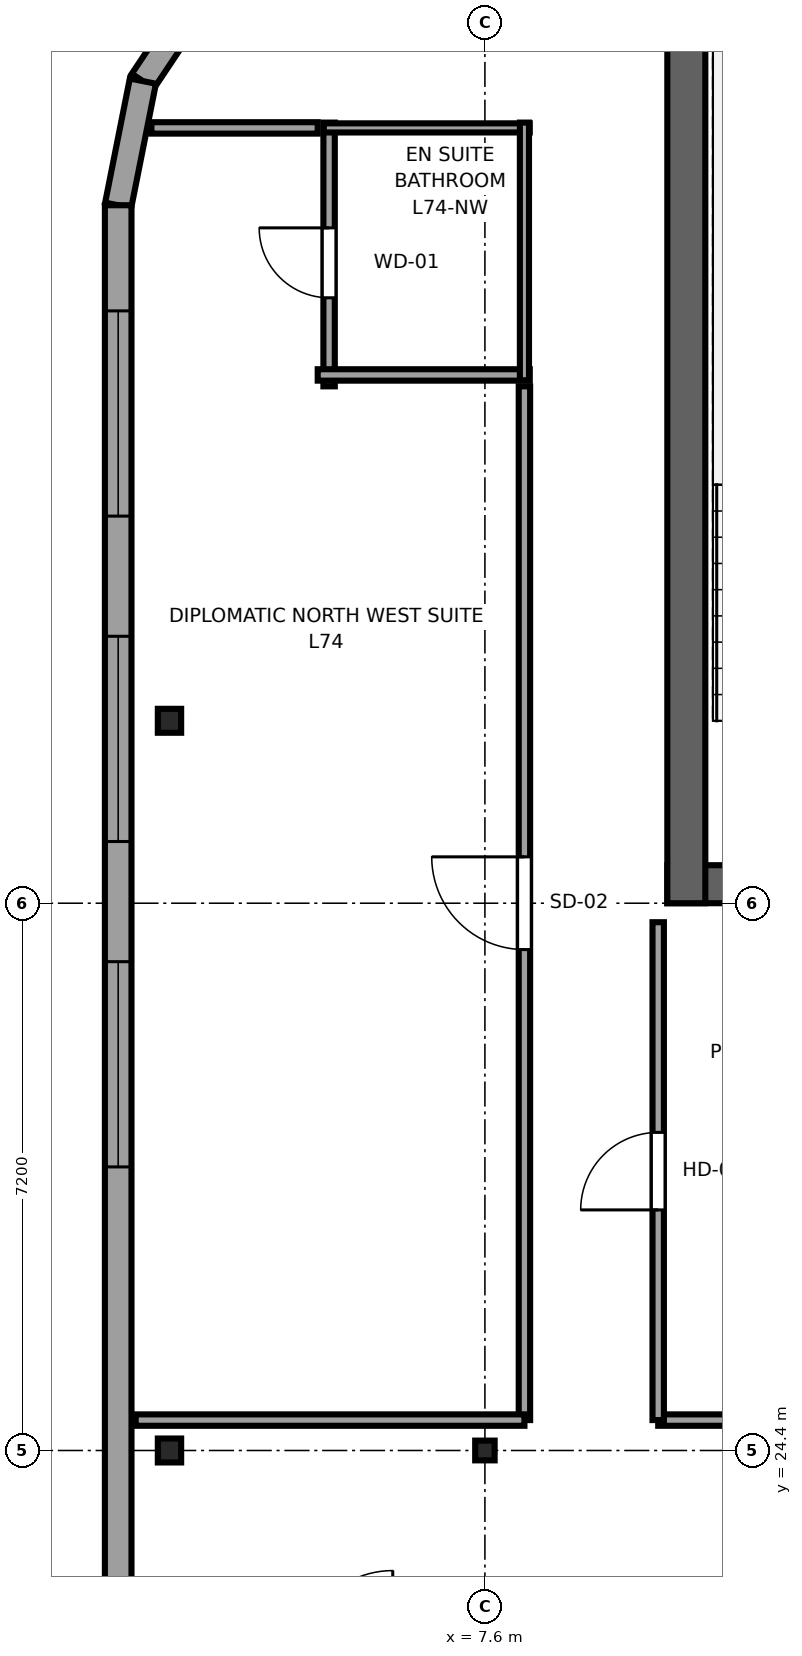
"""IFC4 building model, lengths in metres.
Left out: names, types, materials, properties, quantities, classifications, styles, units other than length and angle.
Written with IfcOpenShell. Run it as: python <this file> out.ifc"""

import sys

from ifc_helpers import new_model, si_unit, direction, frame, frame_2d, origin, origin_2d, place, context, subcontext, project, spatial, rectangle, i_section, extrude, source, transform, mapped, element, fill, save


model = new_model("IFC4")
c1 = context("Model", 3, precision=1e-05, world=origin(), true_north=direction((0.0, 1.0)))
c2 = subcontext(c1, "Body", "Model", "MODEL_VIEW")
j1 = project(units=[si_unit("LENGTHUNIT", "METRE"), si_unit("PLANEANGLEUNIT", "RADIAN")], contexts=[c1])
p1 = place(None, origin())
s1 = spatial("IfcSite", under=j1, at=p1, CompositionType="ELEMENT")
p2 = place(p1, origin())
s2 = spatial("IfcBuilding", under=s1, at=p2, CompositionType="ELEMENT")
p3 = place(p2, frame((0.0, 0.0, 278.6)))
s3 = spatial("IfcBuildingStorey", under=s2, at=p3, CompositionType="ELEMENT", Elevation=278.6)
p4 = place(p3, frame((10.0, 31.85, 0.0), z_axis=(0.0, 0.0, 1.0), x_axis=(1.0, 0.0, 0.0)))
e1 = element("IfcWall", 1, at=p4, inside=s3, PredefinedType="SHEAR", context=c2, shape_type="SweptSolid", body=[
    extrude(rectangle(XDim=26.0, YDim=0.5, at=frame_2d((13.0, 0.0))), origin(), (0.0, 0.0, 1.0), 3.55),
])
p5 = place(p4, frame((7.45, 0.0, 0.0), z_axis=(0.0, 0.0, 1.0), x_axis=(-1.0, 0.0, 0.0)))
e2 = element("IfcOpeningElement", 2, at=p5, cuts=e1, PredefinedType="OPENING", context=c2, shape_type="SweptSolid", body=[
    extrude(rectangle(XDim=1.5, YDim=2.04, at=frame_2d((0.75, 1.02))), frame((0.0, 0.26, 0.0), z_axis=(0.0, -1.0, 0.0), x_axis=(1.0, 0.0, 0.0)), (0.0, 0.0, 1.0), 0.52),
])
p6 = place(p4, frame((13.75, 0.0, 0.0), z_axis=(0.0, 0.0, 1.0), x_axis=(-1.0, 0.0, 0.0)))
e3 = element("IfcOpeningElement", 3, at=p6, cuts=e1, PredefinedType="OPENING", context=c2, shape_type="SweptSolid", body=[
    extrude(rectangle(XDim=1.5, YDim=2.04, at=frame_2d((0.75, 1.02))), frame((0.0, 0.26, 0.0), z_axis=(0.0, -1.0, 0.0), x_axis=(1.0, 0.0, 0.0)), (0.0, 0.0, 1.0), 0.52),
])
p7 = place(p4, frame((20.05, 0.0, 0.0), z_axis=(0.0, 0.0, 1.0), x_axis=(-1.0, 0.0, 0.0)))
e4 = element("IfcOpeningElement", 4, at=p7, cuts=e1, PredefinedType="OPENING", context=c2, shape_type="SweptSolid", body=[
    extrude(rectangle(XDim=1.5, YDim=2.04, at=frame_2d((0.75, 1.02))), frame((0.0, 0.26, 0.0), z_axis=(0.0, -1.0, 0.0), x_axis=(1.0, 0.0, 0.0)), (0.0, 0.0, 1.0), 0.52),
])
p8 = place(p3, frame((10.25, 31.6, 0.0), z_axis=(0.0, 0.0, 1.0), x_axis=(0.0, 1.0, 0.0)))
e5 = element("IfcWall", 5, at=p8, inside=s3, PredefinedType="SHEAR", context=c2, shape_type="SweptSolid", body=[
    extrude(rectangle(XDim=13.6, YDim=0.5, at=frame_2d((6.8, 0.0))), origin(), (0.0, 0.0, 1.0), 3.55),
])
m1 = source(origin(), c2, "Body", "SweptSolid", [
    extrude(i_section(OverallWidth=0.307, OverallDepth=0.315, WebThickness=0.012, FlangeThickness=0.019, FilletRadius=0.017, at=origin_2d()), origin(), (0.0, 0.0, 1.0), 3.55),
])
p9 = place(p3, frame((3.45, 24.4, 0.0), z_axis=(0.0, 0.0, 1.0), x_axis=(1.0, 0.0, 0.0)))
e6 = element("IfcColumn", 6, at=p9, inside=s3, PredefinedType="COLUMN", context=c2, shape_type="MappedRepresentation", body=[
    mapped(m1, transform((0.0, 0.0, 0.0), x_axis=(1.0, 0.0, 0.0), y_axis=(0.0, 1.0, 0.0), z_axis=(0.0, 0.0, 1.0), scale=1.0)),
])
m2 = source(origin(), c2, "Body", "SweptSolid", [
    extrude(i_section(OverallWidth=0.256, OverallDepth=0.26, WebThickness=0.01, FlangeThickness=0.017, FilletRadius=0.014, at=origin_2d()), origin(), (0.0, 0.0, 1.0), 3.55),
])
p10 = place(p3, frame((7.6, 24.4, 0.0), z_axis=(0.0, 0.0, 1.0), x_axis=(1.0, 0.0, 0.0)))
e7 = element("IfcColumn", 7, at=p10, inside=s3, PredefinedType="COLUMN", context=c2, shape_type="MappedRepresentation", body=[
    mapped(m2, transform((0.0, 0.0, 0.0), x_axis=(1.0, 0.0, 0.0), y_axis=(0.0, 1.0, 0.0), z_axis=(0.0, 0.0, 1.0), scale=1.0)),
])
p11 = place(p3, frame((3.45, 34.0, 0.0), z_axis=(0.0, 0.0, 1.0), x_axis=(1.0, 0.0, 0.0)))
e8 = element("IfcColumn", 8, at=p11, inside=s3, PredefinedType="COLUMN", context=c2, shape_type="MappedRepresentation", body=[
    mapped(m1, transform((0.0, 0.0, 0.0), x_axis=(1.0, 0.0, 0.0), y_axis=(0.0, 1.0, 0.0), z_axis=(0.0, 0.0, 1.0), scale=1.0)),
])
p12 = place(p3, frame((4.015, 43.785, 0.0), z_axis=(0.0, 0.0, 1.0), x_axis=(-0.555623290322, -0.831434158098, 0.0)))
e9 = element("IfcWall", 9, at=p12, inside=s3, PredefinedType="SOLIDWALL", context=c2, shape_type="SweptSolid", body=[
    extrude(rectangle(XDim=1.647, YDim=0.35, at=frame_2d((0.824, 0.0))), origin(), (0.0, 0.0, 1.0), 2.86),
])
p13 = place(p3, frame((3.1, 42.416, 0.0), z_axis=(0.0, 0.0, 1.0), x_axis=(-0.195044345786, -0.980794424524, 0.0)))
e10 = element("IfcWall", 10, at=p13, inside=s3, PredefinedType="SOLIDWALL", context=c2, shape_type="SweptSolid", body=[
    extrude(rectangle(XDim=1.665, YDim=0.35, at=frame_2d((0.833, 0.0))), origin(), (0.0, 0.0, 1.0), 3.33),
])
p14 = place(p3, frame((2.775, 40.783, 0.0), z_axis=(0.0, 0.0, 1.0), x_axis=(0.0, -1.0, 0.0)))
e11 = element("IfcWall", 11, at=p14, inside=s3, PredefinedType="SOLIDWALL", context=c2, shape_type="SweptSolid", body=[
    extrude(rectangle(XDim=31.166, YDim=0.35, at=frame_2d((15.583, 0.0))), origin(), (0.0, 0.0, 1.0), 3.33),
])
p15 = place(p14, frame((1.39, 0.0, 0.68)))
e12 = element("IfcOpeningElement", 12, at=p15, cuts=e11, PredefinedType="OPENING", context=c2, shape_type="SweptSolid", body=[
    extrude(rectangle(XDim=2.7, YDim=1.95, at=frame_2d((1.35, 0.975))), frame((0.0, 0.185, 0.0), z_axis=(0.0, -1.0, 0.0), x_axis=(1.0, 0.0, 0.0)), (0.0, 0.0, 1.0), 0.37),
])
p16 = place(p14, frame((5.671, 0.0, 0.68)))
e13 = element("IfcOpeningElement", 13, at=p16, cuts=e11, PredefinedType="OPENING", context=c2, shape_type="SweptSolid", body=[
    extrude(rectangle(XDim=2.7, YDim=1.95, at=frame_2d((1.35, 0.975))), frame((0.0, 0.185, 0.0), z_axis=(0.0, -1.0, 0.0), x_axis=(1.0, 0.0, 0.0)), (0.0, 0.0, 1.0), 0.37),
])
p17 = place(p14, frame((9.952, 0.0, 0.68)))
e14 = element("IfcOpeningElement", 14, at=p17, cuts=e11, PredefinedType="OPENING", context=c2, shape_type="SweptSolid", body=[
    extrude(rectangle(XDim=2.7, YDim=1.95, at=frame_2d((1.35, 0.975))), frame((0.0, 0.185, 0.0), z_axis=(0.0, -1.0, 0.0), x_axis=(1.0, 0.0, 0.0)), (0.0, 0.0, 1.0), 0.37),
])
p18 = place(p14, frame((19.564, 0.0, 0.68)))
e15 = element("IfcOpeningElement", 15, at=p18, cuts=e11, PredefinedType="OPENING", context=c2, shape_type="SweptSolid", body=[
    extrude(rectangle(XDim=2.7, YDim=1.95, at=frame_2d((1.35, 0.975))), frame((0.0, 0.185, 0.0), z_axis=(0.0, -1.0, 0.0), x_axis=(1.0, 0.0, 0.0)), (0.0, 0.0, 1.0), 0.37),
])
p19 = place(p14, frame((27.075, 0.0, 0.68)))
e16 = element("IfcOpeningElement", 16, at=p19, cuts=e11, PredefinedType="OPENING", context=c2, shape_type="SweptSolid", body=[
    extrude(rectangle(XDim=2.7, YDim=1.95, at=frame_2d((1.35, 0.975))), frame((0.0, 0.185, 0.0), z_axis=(0.0, -1.0, 0.0), x_axis=(1.0, 0.0, 0.0)), (0.0, 0.0, 1.0), 0.37),
])
p20 = place(p3, frame((5.55, 38.4, 0.0), z_axis=(0.0, 0.0, 1.0), x_axis=(0.0, 1.0, 0.0)))
e17 = element("IfcWall", 17, at=p20, inside=s3, PredefinedType="PARTITIONING", context=c2, shape_type="SweptSolid", body=[
    extrude(rectangle(XDim=3.47, YDim=0.15, at=frame_2d((1.735, 0.0))), origin(), (0.0, 0.0, 1.0), 3.33),
])
p21 = place(p20, frame((1.165, 0.0, 0.0)))
e18 = element("IfcOpeningElement", 18, at=p21, cuts=e17, PredefinedType="OPENING", context=c2, shape_type="SweptSolid", body=[
    extrude(rectangle(XDim=0.92, YDim=2.01, at=frame_2d((0.46, 1.005))), frame((0.0, 0.085, 0.0), z_axis=(0.0, -1.0, 0.0), x_axis=(1.0, 0.0, 0.0)), (0.0, 0.0, 1.0), 0.17),
])
p22 = place(p3, frame((5.4, 38.55, 0.0), z_axis=(0.0, 0.0, 1.0), x_axis=(1.0, 0.0, 0.0)))
e19 = element("IfcWall", 19, at=p22, inside=s3, PredefinedType="PARTITIONING", context=c2, shape_type="SweptSolid", body=[
    extrude(rectangle(XDim=2.79, YDim=0.15, at=frame_2d((1.395, 0.0))), origin(), (0.0, 0.0, 1.0), 3.33),
])
p23 = place(p3, frame((5.48, 41.8, 0.0), z_axis=(0.0, 0.0, 1.0), x_axis=(1.0, 0.0, 0.0)))
e20 = element("IfcWall", 20, at=p23, inside=s3, PredefinedType="PLUMBINGWALL", context=c2, shape_type="SweptSolid", body=[
    extrude(rectangle(XDim=2.71, YDim=0.12, at=frame_2d((1.355, 0.0))), origin(), (0.0, 0.0, 1.0), 3.33),
])
p24 = place(p3, frame((8.12, 38.48, 0.0), z_axis=(0.0, 0.0, 1.0), x_axis=(0.0, 1.0, 0.0)))
e21 = element("IfcWall", 21, at=p24, inside=s3, PredefinedType="PLUMBINGWALL", context=c2, shape_type="SweptSolid", body=[
    extrude(rectangle(XDim=3.39, YDim=0.12, at=frame_2d((1.695, 0.0))), origin(), (0.0, 0.0, 1.0), 3.33),
])
p25 = place(p3, frame((8.12, 24.8, 0.0), z_axis=(0.0, 0.0, 1.0), x_axis=(0.0, 1.0, 0.0)))
e22 = element("IfcWall", 22, at=p25, inside=s3, PredefinedType="PARTITIONING", context=c2, shape_type="SweptSolid", body=[
    extrude(rectangle(XDim=13.6, YDim=0.15, at=frame_2d((6.8, 0.0))), origin(), (0.0, 0.0, 1.0), 3.33),
])
p26 = place(p25, frame((6.19, 0.0, 0.0)))
e23 = element("IfcOpeningElement", 23, at=p26, cuts=e22, PredefinedType="OPENING", context=c2, shape_type="SweptSolid", body=[
    extrude(rectangle(XDim=1.22, YDim=2.08, at=frame_2d((0.61, 1.04))), frame((0.0, 0.085, 0.0), z_axis=(0.0, -1.0, 0.0), x_axis=(1.0, 0.0, 0.0)), (0.0, 0.0, 1.0), 0.17),
])
p27 = place(p3, frame((3.005, 24.8, 0.0), z_axis=(0.0, 0.0, 1.0), x_axis=(1.0, 0.0, 0.0)))
e24 = element("IfcWall", 24, at=p27, inside=s3, PredefinedType="PARTITIONING", context=c2, shape_type="SweptSolid", body=[
    extrude(rectangle(XDim=5.115, YDim=0.15, at=frame_2d((2.558, 0.0))), origin(), (0.0, 0.0, 1.0), 3.33),
])
p28 = place(p3, frame((3.212, 41.8, 0.0), z_axis=(0.0, 0.0, 1.0), x_axis=(1.0, 0.0, 0.0)))
e25 = element("IfcWall", 25, at=p28, inside=s3, PredefinedType="PARTITIONING", context=c2, shape_type="SweptSolid", body=[
    extrude(rectangle(XDim=2.188, YDim=0.15, at=frame_2d((1.094, 0.0))), origin(), (0.0, 0.0, 1.0), 3.33),
])
p29 = place(p3, frame((9.88, 24.8, 0.0), z_axis=(0.0, 0.0, 1.0), x_axis=(1.0, 0.0, 0.0)))
e26 = element("IfcWall", 26, at=p29, inside=s3, PredefinedType="PARTITIONING", context=c2, shape_type="SweptSolid", body=[
    extrude(rectangle(XDim=4.32, YDim=0.15, at=frame_2d((2.16, 0.0))), origin(), (0.0, 0.0, 1.0), 3.33),
])
p30 = place(p3, frame((9.88, 24.8, 0.0), z_axis=(0.0, 0.0, 1.0), x_axis=(0.0, 1.0, 0.0)))
e27 = element("IfcWall", 27, at=p30, inside=s3, PredefinedType="PARTITIONING", context=c2, shape_type="SweptSolid", body=[
    extrude(rectangle(XDim=6.55, YDim=0.15, at=frame_2d((3.275, 0.0))), origin(), (0.0, 0.0, 1.0), 3.33),
])
p31 = place(p30, frame((2.765, 0.0, 0.0)))
e28 = element("IfcOpeningElement", 28, at=p31, cuts=e27, PredefinedType="OPENING", context=c2, shape_type="SweptSolid", body=[
    extrude(rectangle(XDim=1.02, YDim=2.03, at=frame_2d((0.51, 1.015))), frame((0.0, 0.085, 0.0), z_axis=(0.0, -1.0, 0.0), x_axis=(1.0, 0.0, 0.0)), (0.0, 0.0, 1.0), 0.17),
])
m3 = source(origin(), c2, "Body", "SweptSolid", [
    extrude(rectangle(XDim=2.7, YDim=1.95, at=frame_2d((1.35, 0.975))), frame((0.0, 0.09, 0.0), z_axis=(0.0, -1.0, 0.0), x_axis=(1.0, 0.0, 0.0)), (0.0, 0.0, 1.0), 0.06),
])
p32 = place(p15, origin())
e29 = element("IfcWindow", 29, at=p32, inside=s3, PartitioningType="TRIPLE_PANEL_HORIZONTAL", PredefinedType="WINDOW", context=c2, shape_type="MappedRepresentation", body=[
    mapped(m3, transform((0.0, 0.0, 0.0), x_axis=(1.0, 0.0, 0.0), y_axis=(0.0, 1.0, 0.0), z_axis=(0.0, 0.0, 1.0), scale=1.0)),
])
fill(e12, e29)
p33 = place(p16, origin())
e30 = element("IfcWindow", 30, at=p33, inside=s3, PartitioningType="TRIPLE_PANEL_HORIZONTAL", PredefinedType="WINDOW", context=c2, shape_type="MappedRepresentation", body=[
    mapped(m3, transform((0.0, 0.0, 0.0), x_axis=(1.0, 0.0, 0.0), y_axis=(0.0, 1.0, 0.0), z_axis=(0.0, 0.0, 1.0), scale=1.0)),
])
fill(e13, e30)
p34 = place(p17, origin())
e31 = element("IfcWindow", 31, at=p34, inside=s3, PartitioningType="TRIPLE_PANEL_HORIZONTAL", PredefinedType="WINDOW", context=c2, shape_type="MappedRepresentation", body=[
    mapped(m3, transform((0.0, 0.0, 0.0), x_axis=(1.0, 0.0, 0.0), y_axis=(0.0, 1.0, 0.0), z_axis=(0.0, 0.0, 1.0), scale=1.0)),
])
fill(e14, e31)
m4 = source(origin(), c2, "Body", "SweptSolid", [
    extrude(rectangle(XDim=0.92, YDim=2.01, at=frame_2d((0.46, 1.005))), frame((0.0, 0.025, 0.0), z_axis=(0.0, -1.0, 0.0), x_axis=(1.0, 0.0, 0.0)), (0.0, 0.0, 1.0), 0.05),
])
p35 = place(p21, origin())
e32 = element("IfcDoor", 32, at=p35, inside=s3, OperationType="SINGLE_SWING_RIGHT", PredefinedType="DOOR", context=c2, shape_type="MappedRepresentation", body=[
    mapped(m4, transform((0.0, 0.0, 0.0), x_axis=(1.0, 0.0, 0.0), y_axis=(0.0, 1.0, 0.0), z_axis=(0.0, 0.0, 1.0), scale=1.0)),
])
fill(e18, e32)
m5 = source(origin(), c2, "Body", "SweptSolid", [
    extrude(rectangle(XDim=1.22, YDim=2.08, at=frame_2d((0.61, 1.04))), frame((0.0, 0.025, 0.0), z_axis=(0.0, -1.0, 0.0), x_axis=(1.0, 0.0, 0.0)), (0.0, 0.0, 1.0), 0.05),
])
p36 = place(p26, origin())
e33 = element("IfcDoor", 33, at=p36, inside=s3, OperationType="SINGLE_SWING_RIGHT", PredefinedType="DOOR", context=c2, shape_type="MappedRepresentation", body=[
    mapped(m5, transform((0.0, 0.0, 0.0), x_axis=(1.0, 0.0, 0.0), y_axis=(0.0, 1.0, 0.0), z_axis=(0.0, 0.0, 1.0), scale=1.0)),
])
fill(e23, e33)
m6 = source(origin(), c2, "Body", "SweptSolid", [
    extrude(rectangle(XDim=1.02, YDim=2.03, at=frame_2d((0.51, 1.015))), frame((0.0, 0.025, 0.0), z_axis=(0.0, -1.0, 0.0), x_axis=(1.0, 0.0, 0.0)), (0.0, 0.0, 1.0), 0.05),
])
p37 = place(p31, origin())
e34 = element("IfcDoor", 34, at=p37, inside=s3, OperationType="SINGLE_SWING_LEFT", PredefinedType="DOOR", context=c2, shape_type="MappedRepresentation", body=[
    mapped(m6, transform((0.0, 0.0, 0.0), x_axis=(1.0, 0.0, 0.0), y_axis=(0.0, 1.0, 0.0), z_axis=(0.0, 0.0, 1.0), scale=1.0)),
])
fill(e28, e34)
save(model, sys.argv[1])
